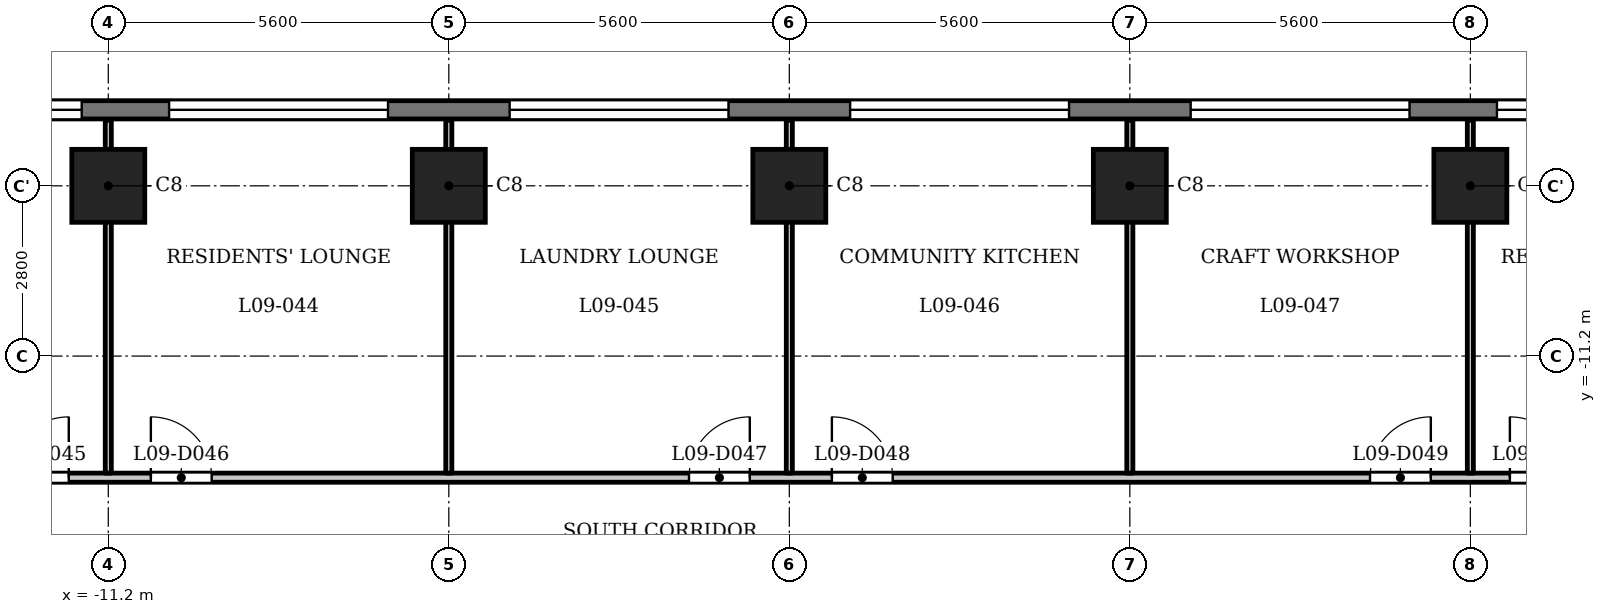
"""IFC4 building model, lengths in metres.
Left out: names, types, materials, properties, quantities, classifications, styles, units other than length and angle.
Written with IfcOpenShell. Run it as: python <this file> out.ifc"""

import sys

from ifc_helpers import new_model, si_unit, direction, frame, frame_2d, origin, origin_2d, place, context, subcontext, project, spatial, rectangle, extrude, element, fill, save


model = new_model("IFC4")
c1 = context("Model", 3, precision=1e-05, world=origin(), true_north=direction((0.0, 1.0)))
c2 = subcontext(c1, "Body", "Model", "MODEL_VIEW")
j1 = project(units=[si_unit("LENGTHUNIT", "METRE"), si_unit("PLANEANGLEUNIT", "RADIAN")], contexts=[c1])
p1 = place(None, origin())
s1 = spatial("IfcSite", under=j1, at=p1, CompositionType="ELEMENT")
p2 = place(p1, origin())
s2 = spatial("IfcBuilding", under=s1, at=p2, CompositionType="ELEMENT")
p3 = place(p2, frame((0.0, 0.0, 41.0)))
s3 = spatial("IfcBuildingStorey", under=s2, at=p3, CompositionType="ELEMENT", Elevation=41.0)
for number, where, z_axis, x_axis in (
    (1, (-11.2, -8.4, 0.0), (0.0, 0.0, 1.0), (1.0, 0.0, 0.0)),
    (2, (-5.6, -8.4, 0.0), (0.0, 0.0, 1.0), (1.0, 0.0, 0.0)),
    (3, (0.0, -8.4, 0.0), (0.0, 0.0, 1.0), (1.0, 0.0, 0.0)),
    (4, (5.6, -8.4, 0.0), (0.0, 0.0, 1.0), (1.0, 0.0, 0.0)),
    (5, (11.2, -8.4, 0.0), (0.0, 0.0, 1.0), (1.0, 0.0, 0.0)),
):
    element("IfcColumn", number, at=place(p3, frame(where, z_axis=z_axis, x_axis=x_axis)), inside=s3, PredefinedType="COLUMN", context=c2, shape_type="SweptSolid", body=[
        extrude(rectangle(XDim=1.2, YDim=1.2, at=origin_2d()), origin(), (0.0, 0.0, 1.0), 3.5),
    ])
p4 = place(p3, frame((13.8, -7.15, 0.0), z_axis=(0.0, 0.0, 1.0), x_axis=(-1.0, 0.0, 0.0)))
e6 = element("IfcWall", 6, at=p4, inside=s3, PredefinedType="SOLIDWALL", context=c2, shape_type="SweptSolid", body=[
    extrude(rectangle(XDim=27.6, YDim=0.3, at=frame_2d((13.8, 0.0))), origin(), (0.0, 0.0, 1.0), 3.2),
])
p5 = place(p4, frame((0.363, 0.0, 0.9)))
e7 = element("IfcOpeningElement", 7, at=p5, cuts=e6, PredefinedType="OPENING", context=c2, shape_type="SweptSolid", body=[
    extrude(rectangle(XDim=1.8, YDim=1.25, at=frame_2d((0.9, 0.625))), frame((0.0, 0.16, 0.0), z_axis=(0.0, -1.0, 0.0), x_axis=(1.0, 0.0, 0.0)), (0.0, 0.0, 1.0), 0.32),
])
p6 = place(p4, frame((3.6, 0.0, 1.2)))
e8 = element("IfcOpeningElement", 8, at=p6, cuts=e6, PredefinedType="OPENING", context=c2, shape_type="SweptSolid", body=[
    extrude(rectangle(XDim=3.6, YDim=0.95, at=frame_2d((1.8, 0.475))), frame((0.0, 0.16, 0.0), z_axis=(0.0, -1.0, 0.0), x_axis=(1.0, 0.0, 0.0)), (0.0, 0.0, 1.0), 0.32),
])
p7 = place(p4, frame((9.2, 0.0, 1.2)))
e9 = element("IfcOpeningElement", 9, at=p7, cuts=e6, PredefinedType="OPENING", context=c2, shape_type="SweptSolid", body=[
    extrude(rectangle(XDim=3.6, YDim=0.95, at=frame_2d((1.8, 0.475))), frame((0.0, 0.16, 0.0), z_axis=(0.0, -1.0, 0.0), x_axis=(1.0, 0.0, 0.0)), (0.0, 0.0, 1.0), 0.32),
])
p8 = place(p4, frame((14.8, 0.0, 1.2)))
e10 = element("IfcOpeningElement", 10, at=p8, cuts=e6, PredefinedType="OPENING", context=c2, shape_type="SweptSolid", body=[
    extrude(rectangle(XDim=3.6, YDim=0.95, at=frame_2d((1.8, 0.475))), frame((0.0, 0.16, 0.0), z_axis=(0.0, -1.0, 0.0), x_axis=(1.0, 0.0, 0.0)), (0.0, 0.0, 1.0), 0.32),
])
p9 = place(p4, frame((20.4, 0.0, 1.2)))
e11 = element("IfcOpeningElement", 11, at=p9, cuts=e6, PredefinedType="OPENING", context=c2, shape_type="SweptSolid", body=[
    extrude(rectangle(XDim=3.6, YDim=0.95, at=frame_2d((1.8, 0.475))), frame((0.0, 0.16, 0.0), z_axis=(0.0, -1.0, 0.0), x_axis=(1.0, 0.0, 0.0)), (0.0, 0.0, 1.0), 0.32),
])
p10 = place(p4, frame((25.438, 0.0, 0.9)))
e12 = element("IfcOpeningElement", 12, at=p10, cuts=e6, PredefinedType="OPENING", context=c2, shape_type="SweptSolid", body=[
    extrude(rectangle(XDim=1.8, YDim=1.25, at=frame_2d((0.9, 0.625))), frame((0.0, 0.16, 0.0), z_axis=(0.0, -1.0, 0.0), x_axis=(1.0, 0.0, 0.0)), (0.0, 0.0, 1.0), 0.32),
])
p11 = place(p3, frame((-17.4, -13.2, 0.0), z_axis=(0.0, 0.0, 1.0), x_axis=(1.0, 0.0, 0.0)))
e13 = element("IfcWall", 13, at=p11, inside=s3, PredefinedType="PARTITIONING", context=c2, shape_type="SweptSolid", body=[
    extrude(rectangle(XDim=34.8, YDim=0.15, at=frame_2d((17.4, 0.0))), origin(), (0.0, 0.0, 1.0), 3.2),
])
p12 = place(p11, frame((0.65, 0.0, 0.0)))
e14 = element("IfcOpeningElement", 14, at=p12, cuts=e13, PredefinedType="OPENING", context=c2, shape_type="SweptSolid", body=[
    extrude(rectangle(XDim=1.0, YDim=2.1, at=frame_2d((0.5, 1.05))), frame((0.0, 0.085, 0.0), z_axis=(0.0, -1.0, 0.0), x_axis=(1.0, 0.0, 0.0)), (0.0, 0.0, 1.0), 0.17),
])
p13 = place(p11, frame((33.05, 0.0, 0.0)))
e15 = element("IfcOpeningElement", 15, at=p13, cuts=e13, PredefinedType="OPENING", context=c2, shape_type="SweptSolid", body=[
    extrude(rectangle(XDim=1.0, YDim=2.1, at=frame_2d((0.5, 1.05))), frame((0.0, 0.085, 0.0), z_axis=(0.0, -1.0, 0.0), x_axis=(1.0, 0.0, 0.0)), (0.0, 0.0, 1.0), 0.17),
])
p14 = place(p11, frame((4.55, 0.0, 0.0)))
e16 = element("IfcOpeningElement", 16, at=p14, cuts=e13, PredefinedType="OPENING", context=c2, shape_type="SweptSolid", body=[
    extrude(rectangle(XDim=1.0, YDim=2.1, at=frame_2d((0.5, 1.05))), frame((0.0, 0.085, 0.0), z_axis=(0.0, -1.0, 0.0), x_axis=(1.0, 0.0, 0.0)), (0.0, 0.0, 1.0), 0.17),
])
p15 = place(p11, frame((6.9, 0.0, 0.0)))
e17 = element("IfcOpeningElement", 17, at=p15, cuts=e13, PredefinedType="OPENING", context=c2, shape_type="SweptSolid", body=[
    extrude(rectangle(XDim=1.0, YDim=2.1, at=frame_2d((0.5, 1.05))), frame((0.0, 0.085, 0.0), z_axis=(0.0, -1.0, 0.0), x_axis=(1.0, 0.0, 0.0)), (0.0, 0.0, 1.0), 0.17),
])
p16 = place(p11, frame((15.75, 0.0, 0.0)))
e18 = element("IfcOpeningElement", 18, at=p16, cuts=e13, PredefinedType="OPENING", context=c2, shape_type="SweptSolid", body=[
    extrude(rectangle(XDim=1.0, YDim=2.1, at=frame_2d((0.5, 1.05))), frame((0.0, 0.085, 0.0), z_axis=(0.0, -1.0, 0.0), x_axis=(1.0, 0.0, 0.0)), (0.0, 0.0, 1.0), 0.17),
])
p17 = place(p11, frame((18.1, 0.0, 0.0)))
e19 = element("IfcOpeningElement", 19, at=p17, cuts=e13, PredefinedType="OPENING", context=c2, shape_type="SweptSolid", body=[
    extrude(rectangle(XDim=1.0, YDim=2.1, at=frame_2d((0.5, 1.05))), frame((0.0, 0.085, 0.0), z_axis=(0.0, -1.0, 0.0), x_axis=(1.0, 0.0, 0.0)), (0.0, 0.0, 1.0), 0.17),
])
p18 = place(p11, frame((26.95, 0.0, 0.0)))
e20 = element("IfcOpeningElement", 20, at=p18, cuts=e13, PredefinedType="OPENING", context=c2, shape_type="SweptSolid", body=[
    extrude(rectangle(XDim=1.0, YDim=2.1, at=frame_2d((0.5, 1.05))), frame((0.0, 0.085, 0.0), z_axis=(0.0, -1.0, 0.0), x_axis=(1.0, 0.0, 0.0)), (0.0, 0.0, 1.0), 0.17),
])
p19 = place(p11, frame((29.25, 0.0, 0.0)))
e21 = element("IfcOpeningElement", 21, at=p19, cuts=e13, PredefinedType="OPENING", context=c2, shape_type="SweptSolid", body=[
    extrude(rectangle(XDim=1.0, YDim=2.1, at=frame_2d((0.5, 1.05))), frame((0.0, 0.085, 0.0), z_axis=(0.0, -1.0, 0.0), x_axis=(1.0, 0.0, 0.0)), (0.0, 0.0, 1.0), 0.17),
])
for number, where, z_axis, x_axis in (
    (22, (-11.2, -13.125, 0.0), (0.0, 0.0, 1.0), (0.0, 1.0, 0.0)),
    (23, (-5.6, -13.125, 0.0), (0.0, 0.0, 1.0), (0.0, 1.0, 0.0)),
    (24, (0.0, -13.125, 0.0), (0.0, 0.0, 1.0), (0.0, 1.0, 0.0)),
    (25, (5.6, -13.125, 0.0), (0.0, 0.0, 1.0), (0.0, 1.0, 0.0)),
    (26, (11.2, -13.125, 0.0), (0.0, 0.0, 1.0), (0.0, 1.0, 0.0)),
):
    element("IfcWall", number, at=place(p3, frame(where, z_axis=z_axis, x_axis=x_axis)), inside=s3, PredefinedType="PARTITIONING", context=c2, shape_type="SweptSolid", body=[
        extrude(rectangle(XDim=5.805, YDim=0.1, at=frame_2d((2.902, 0.0))), origin(), (0.0, 0.0, 1.0), 3.2),
    ])
p20 = place(p14, origin())
e27 = element("IfcDoor", 27, at=p20, inside=s3, OperationType="SINGLE_SWING_LEFT", PredefinedType="DOOR", context=c2, shape_type="SweptSolid", body=[
    extrude(rectangle(XDim=1.0, YDim=2.1, at=frame_2d((0.5, 1.05))), frame((0.0, 0.025, 0.0), z_axis=(0.0, -1.0, 0.0), x_axis=(1.0, 0.0, 0.0)), (0.0, 0.0, 1.0), 0.05),
])
fill(e16, e27)
p21 = place(p15, origin())
e28 = element("IfcDoor", 28, at=p21, inside=s3, OperationType="SINGLE_SWING_RIGHT", PredefinedType="DOOR", context=c2, shape_type="SweptSolid", body=[
    extrude(rectangle(XDim=1.0, YDim=2.1, at=frame_2d((0.5, 1.05))), frame((0.0, 0.025, 0.0), z_axis=(0.0, -1.0, 0.0), x_axis=(1.0, 0.0, 0.0)), (0.0, 0.0, 1.0), 0.05),
])
fill(e17, e28)
p22 = place(p16, origin())
e29 = element("IfcDoor", 29, at=p22, inside=s3, OperationType="SINGLE_SWING_LEFT", PredefinedType="DOOR", context=c2, shape_type="SweptSolid", body=[
    extrude(rectangle(XDim=1.0, YDim=2.1, at=frame_2d((0.5, 1.05))), frame((0.0, 0.025, 0.0), z_axis=(0.0, -1.0, 0.0), x_axis=(1.0, 0.0, 0.0)), (0.0, 0.0, 1.0), 0.05),
])
fill(e18, e29)
p23 = place(p17, origin())
e30 = element("IfcDoor", 30, at=p23, inside=s3, OperationType="SINGLE_SWING_RIGHT", PredefinedType="DOOR", context=c2, shape_type="SweptSolid", body=[
    extrude(rectangle(XDim=1.0, YDim=2.1, at=frame_2d((0.5, 1.05))), frame((0.0, 0.025, 0.0), z_axis=(0.0, -1.0, 0.0), x_axis=(1.0, 0.0, 0.0)), (0.0, 0.0, 1.0), 0.05),
])
fill(e19, e30)
p24 = place(p18, origin())
e31 = element("IfcDoor", 31, at=p24, inside=s3, OperationType="SINGLE_SWING_LEFT", PredefinedType="DOOR", context=c2, shape_type="SweptSolid", body=[
    extrude(rectangle(XDim=1.0, YDim=2.1, at=frame_2d((0.5, 1.05))), frame((0.0, 0.025, 0.0), z_axis=(0.0, -1.0, 0.0), x_axis=(1.0, 0.0, 0.0)), (0.0, 0.0, 1.0), 0.05),
])
fill(e20, e31)
p25 = place(p19, origin())
e32 = element("IfcDoor", 32, at=p25, inside=s3, OperationType="SINGLE_SWING_RIGHT", PredefinedType="DOOR", context=c2, shape_type="SweptSolid", body=[
    extrude(rectangle(XDim=1.0, YDim=2.1, at=frame_2d((0.5, 1.05))), frame((0.0, 0.025, 0.0), z_axis=(0.0, -1.0, 0.0), x_axis=(1.0, 0.0, 0.0)), (0.0, 0.0, 1.0), 0.05),
])
fill(e21, e32)
p26 = place(p5, origin())
e33 = element("IfcWindow", 33, at=p26, inside=s3, PartitioningType="SINGLE_PANEL", PredefinedType="WINDOW", context=c2, shape_type="SweptSolid", body=[
    extrude(rectangle(XDim=1.8, YDim=1.25, at=frame_2d((0.9, 0.625))), frame((0.0, 0.03, 0.0), z_axis=(0.0, -1.0, 0.0), x_axis=(1.0, 0.0, 0.0)), (0.0, 0.0, 1.0), 0.06),
])
fill(e7, e33)
p27 = place(p6, origin())
e34 = element("IfcWindow", 34, at=p27, inside=s3, PartitioningType="SINGLE_PANEL", PredefinedType="WINDOW", context=c2, shape_type="SweptSolid", body=[
    extrude(rectangle(XDim=3.6, YDim=0.95, at=frame_2d((1.8, 0.475))), frame((0.0, 0.03, 0.0), z_axis=(0.0, -1.0, 0.0), x_axis=(1.0, 0.0, 0.0)), (0.0, 0.0, 1.0), 0.06),
])
fill(e8, e34)
p28 = place(p7, origin())
e35 = element("IfcWindow", 35, at=p28, inside=s3, PartitioningType="SINGLE_PANEL", PredefinedType="WINDOW", context=c2, shape_type="SweptSolid", body=[
    extrude(rectangle(XDim=3.6, YDim=0.95, at=frame_2d((1.8, 0.475))), frame((0.0, 0.03, 0.0), z_axis=(0.0, -1.0, 0.0), x_axis=(1.0, 0.0, 0.0)), (0.0, 0.0, 1.0), 0.06),
])
fill(e9, e35)
p29 = place(p8, origin())
e36 = element("IfcWindow", 36, at=p29, inside=s3, PartitioningType="SINGLE_PANEL", PredefinedType="WINDOW", context=c2, shape_type="SweptSolid", body=[
    extrude(rectangle(XDim=3.6, YDim=0.95, at=frame_2d((1.8, 0.475))), frame((0.0, 0.03, 0.0), z_axis=(0.0, -1.0, 0.0), x_axis=(1.0, 0.0, 0.0)), (0.0, 0.0, 1.0), 0.06),
])
fill(e10, e36)
p30 = place(p9, origin())
e37 = element("IfcWindow", 37, at=p30, inside=s3, PartitioningType="SINGLE_PANEL", PredefinedType="WINDOW", context=c2, shape_type="SweptSolid", body=[
    extrude(rectangle(XDim=3.6, YDim=0.95, at=frame_2d((1.8, 0.475))), frame((0.0, 0.03, 0.0), z_axis=(0.0, -1.0, 0.0), x_axis=(1.0, 0.0, 0.0)), (0.0, 0.0, 1.0), 0.06),
])
fill(e11, e37)
p31 = place(p10, origin())
e38 = element("IfcWindow", 38, at=p31, inside=s3, PartitioningType="SINGLE_PANEL", PredefinedType="WINDOW", context=c2, shape_type="SweptSolid", body=[
    extrude(rectangle(XDim=1.8, YDim=1.25, at=frame_2d((0.9, 0.625))), frame((0.0, 0.03, 0.0), z_axis=(0.0, -1.0, 0.0), x_axis=(1.0, 0.0, 0.0)), (0.0, 0.0, 1.0), 0.06),
])
fill(e12, e38)
save(model, sys.argv[1])
